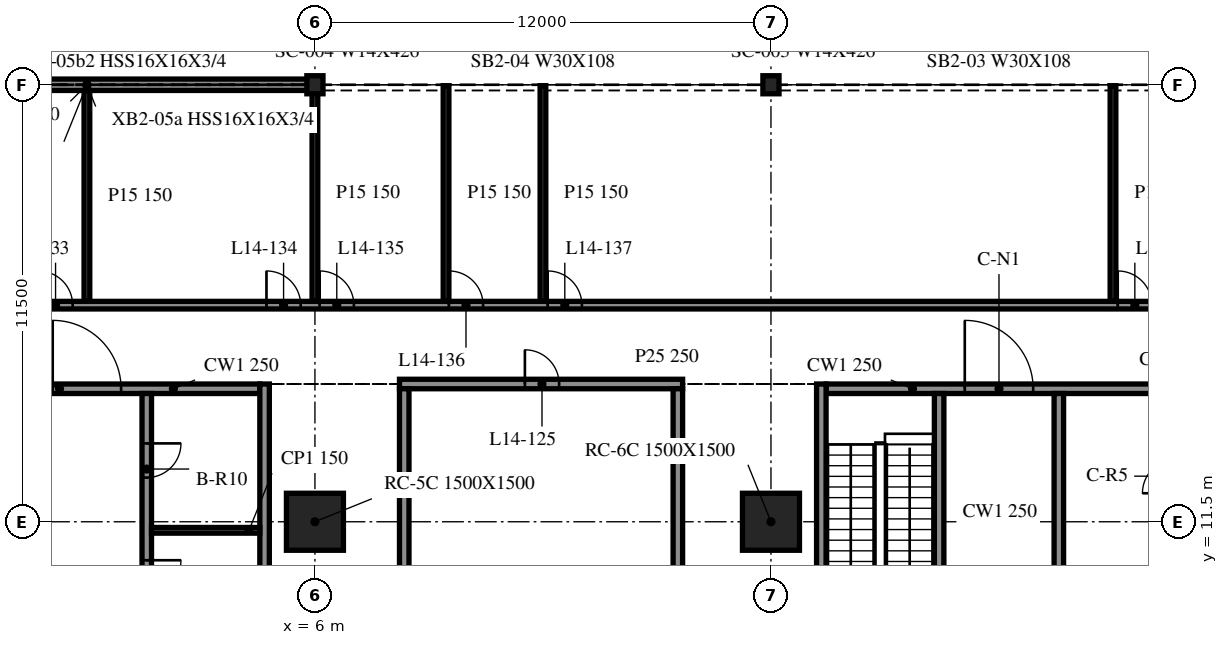
"""IFC4 building model, lengths in metres.
Left out: names, types, materials, properties, quantities, classifications, styles, units other than length and angle.
Written with IfcOpenShell. Run it as: python <this file> out.ifc"""

import sys

from ifc_helpers import new_model, si_unit, direction, frame, frame_2d, origin, origin_2d, place, context, subcontext, project, spatial, rectangle, i_section, extrude, element, fill, save


model = new_model("IFC4")
c1 = context("Model", 3, precision=1e-05, world=origin(), true_north=direction((0.0, 1.0)))
c2 = subcontext(c1, "Body", "Model", "MODEL_VIEW")
j1 = project(units=[si_unit("LENGTHUNIT", "METRE"), si_unit("PLANEANGLEUNIT", "RADIAN")], contexts=[c1])
p1 = place(None, origin())
s1 = spatial("IfcSite", under=j1, at=p1, CompositionType="ELEMENT")
p2 = place(p1, origin())
s2 = spatial("IfcBuilding", under=s1, at=p2, CompositionType="ELEMENT")
p3 = place(p2, frame((0.0, 0.0, 63.2)))
s3 = spatial("IfcBuildingStorey", under=s2, at=p3, CompositionType="ELEMENT", Elevation=63.2)
for number, where, z_axis, x_axis in (
    (1, (6.0, 11.5, -0.34), (0.0, 0.0, 1.0), (1.0, 0.0, 0.0)),
    (2, (18.0, 11.5, -0.34), (0.0, 0.0, 1.0), (1.0, 0.0, 0.0)),
):
    element("IfcColumn", number, at=place(p3, frame(where, z_axis=z_axis, x_axis=x_axis)), inside=s3, PredefinedType="COLUMN", context=c2, shape_type="SweptSolid", body=[
        extrude(rectangle(XDim=1.5, YDim=1.5, at=origin_2d()), origin(), (0.0, 0.0, 1.0), 4.3),
    ])
for number, where, z_axis, x_axis in (
    (3, (18.0, 23.0, -0.34), (0.0, 0.0, 1.0), (1.0, 0.0, 0.0)),
    (4, (6.0, 23.0, -0.34), (0.0, 0.0, 1.0), (1.0, 0.0, 0.0)),
):
    element("IfcColumn", number, at=place(p3, frame(where, z_axis=z_axis, x_axis=x_axis)), inside=s3, PredefinedType="COLUMN", context=c2, shape_type="SweptSolid", body=[
        extrude(i_section(OverallWidth=0.424, OverallDepth=0.475, WebThickness=0.048, FlangeThickness=0.077, at=origin_2d()), origin(), (0.0, 0.0, 1.0), 4.3),
    ])
p4 = place(p3, frame((5.976, 23.0, 0.0), z_axis=(0.0, 0.0, 1.0), x_axis=(-1.0, 0.0, 0.0)))
e5 = element("IfcWall", 5, at=p4, inside=s3, PredefinedType="NOTDEFINED", context=c2, shape_type="SweptSolid", body=[
    extrude(rectangle(XDim=11.952, YDim=0.3, at=frame_2d((5.976, 0.0))), origin(), (0.0, 0.0, 1.0), 3.203),
])
p5 = place(p3, frame((4.675, -9.125, 0.0), z_axis=(0.0, 0.0, 1.0), x_axis=(0.0, 1.0, 0.0)))
e6 = element("IfcWall", 6, at=p5, inside=s3, PredefinedType="SOLIDWALL", context=c2, shape_type="SweptSolid", body=[
    extrude(rectangle(XDim=24.25, YDim=0.25, at=frame_2d((12.125, 0.0))), origin(), (0.0, 0.0, 1.0), 3.96),
])
p6 = place(p3, frame((-4.55, 15.0, 0.0), z_axis=(0.0, 0.0, 1.0), x_axis=(1.0, 0.0, 0.0)))
e7 = element("IfcWall", 7, at=p6, inside=s3, PredefinedType="SOLIDWALL", context=c2, shape_type="SweptSolid", body=[
    extrude(rectangle(XDim=9.1, YDim=0.25, at=frame_2d((4.55, 0.0))), origin(), (0.0, 0.0, 1.0), 3.96),
])
p7 = place(p6, frame((3.65, 0.0, 0.0)))
e8 = element("IfcOpeningElement", 8, at=p7, cuts=e7, PredefinedType="OPENING", context=c2, shape_type="SweptSolid", body=[
    extrude(rectangle(XDim=1.8, YDim=2.1, at=frame_2d((0.9, 1.05))), frame((0.0, 0.135, 0.0), z_axis=(0.0, -1.0, 0.0), x_axis=(1.0, 0.0, 0.0)), (0.0, 0.0, 1.0), 0.27),
])
p8 = place(p3, frame((1.575, 14.875, 0.0), z_axis=(0.0, 0.0, 1.0), x_axis=(0.0, -1.0, 0.0)))
e9 = element("IfcWall", 9, at=p8, inside=s3, PredefinedType="SOLIDWALL", context=c2, shape_type="SweptSolid", body=[
    extrude(rectangle(XDim=17.5, YDim=0.25, at=frame_2d((8.75, 0.0))), origin(), (0.0, 0.0, 1.0), 3.96),
])
p9 = place(p8, frame((15.225, 0.0, 0.0)))
e10 = element("IfcOpeningElement", 10, at=p9, cuts=e9, PredefinedType="OPENING", context=c2, shape_type="SweptSolid", body=[
    extrude(rectangle(XDim=0.9, YDim=2.1, at=frame_2d((0.45, 1.05))), frame((0.0, 0.135, 0.0), z_axis=(0.0, -1.0, 0.0), x_axis=(1.0, 0.0, 0.0)), (0.0, 0.0, 1.0), 0.27),
])
p10 = place(p8, frame((11.425, 0.0, 0.0)))
e11 = element("IfcOpeningElement", 11, at=p10, cuts=e9, PredefinedType="OPENING", context=c2, shape_type="SweptSolid", body=[
    extrude(rectangle(XDim=0.9, YDim=2.1, at=frame_2d((0.45, 1.05))), frame((0.0, 0.135, 0.0), z_axis=(0.0, -1.0, 0.0), x_axis=(1.0, 0.0, 0.0)), (0.0, 0.0, 1.0), 0.27),
])
p11 = place(p8, frame((7.625, 0.0, 0.0)))
e12 = element("IfcOpeningElement", 12, at=p11, cuts=e9, PredefinedType="OPENING", context=c2, shape_type="SweptSolid", body=[
    extrude(rectangle(XDim=0.9, YDim=2.1, at=frame_2d((0.45, 1.05))), frame((0.0, 0.135, 0.0), z_axis=(0.0, -1.0, 0.0), x_axis=(1.0, 0.0, 0.0)), (0.0, 0.0, 1.0), 0.27),
])
p12 = place(p8, frame((4.387, 0.0, 0.0)))
e13 = element("IfcOpeningElement", 13, at=p12, cuts=e9, PredefinedType="OPENING", context=c2, shape_type="SweptSolid", body=[
    extrude(rectangle(XDim=0.9, YDim=2.1, at=frame_2d((0.45, 1.05))), frame((0.0, 0.135, 0.0), z_axis=(0.0, -1.0, 0.0), x_axis=(1.0, 0.0, 0.0)), (0.0, 0.0, 1.0), 0.27),
])
p13 = place(p8, frame((1.312, 0.0, 0.0)))
e14 = element("IfcOpeningElement", 14, at=p13, cuts=e9, PredefinedType="OPENING", context=c2, shape_type="SweptSolid", body=[
    extrude(rectangle(XDim=0.9, YDim=2.1, at=frame_2d((0.45, 1.05))), frame((0.0, 0.135, 0.0), z_axis=(0.0, -1.0, 0.0), x_axis=(1.0, 0.0, 0.0)), (0.0, 0.0, 1.0), 0.27),
])
p14 = place(p3, frame((1.7, 11.275, 0.0), z_axis=(0.0, 0.0, 1.0), x_axis=(1.0, 0.0, 0.0)))
e15 = element("IfcWall", 15, at=p14, inside=s3, PredefinedType="PARTITIONING", context=c2, shape_type="SweptSolid", body=[
    extrude(rectangle(XDim=2.85, YDim=0.15, at=frame_2d((1.425, 0.0))), origin(), (0.0, 0.0, 1.0), 3.96),
])
p15 = place(p3, frame((19.325, 15.125, 0.0), z_axis=(0.0, 0.0, 1.0), x_axis=(0.0, -1.0, 0.0)))
e16 = element("IfcWall", 16, at=p15, inside=s3, PredefinedType="SOLIDWALL", context=c2, shape_type="SweptSolid", body=[
    extrude(rectangle(XDim=24.25, YDim=0.25, at=frame_2d((12.125, 0.0))), origin(), (0.0, 0.0, 1.0), 3.96),
])
p16 = place(p3, frame((19.45, 15.0, 0.0), z_axis=(0.0, 0.0, 1.0), x_axis=(1.0, 0.0, 0.0)))
e17 = element("IfcWall", 17, at=p16, inside=s3, PredefinedType="SOLIDWALL", context=c2, shape_type="SweptSolid", body=[
    extrude(rectangle(XDim=9.1, YDim=0.25, at=frame_2d((4.55, 0.0))), origin(), (0.0, 0.0, 1.0), 3.96),
])
p17 = place(p16, frame((3.65, 0.0, 0.0)))
e18 = element("IfcOpeningElement", 18, at=p17, cuts=e17, PredefinedType="OPENING", context=c2, shape_type="SweptSolid", body=[
    extrude(rectangle(XDim=1.8, YDim=2.1, at=frame_2d((0.9, 1.05))), frame((0.0, 0.135, 0.0), z_axis=(0.0, -1.0, 0.0), x_axis=(1.0, 0.0, 0.0)), (0.0, 0.0, 1.0), 0.27),
])
p18 = place(p3, frame((22.425, 14.875, 0.0), z_axis=(0.0, 0.0, 1.0), x_axis=(0.0, -1.0, 0.0)))
e19 = element("IfcWall", 19, at=p18, inside=s3, PredefinedType="SOLIDWALL", context=c2, shape_type="SweptSolid", body=[
    extrude(rectangle(XDim=6.25, YDim=0.25, at=frame_2d((3.125, 0.0))), origin(), (0.0, 0.0, 1.0), 3.96),
])
p19 = place(p18, frame((4.85, 0.0, 0.0)))
e20 = element("IfcOpeningElement", 20, at=p19, cuts=e19, PredefinedType="OPENING", context=c2, shape_type="SweptSolid", body=[
    extrude(rectangle(XDim=1.0, YDim=2.1, at=frame_2d((0.5, 1.05))), frame((0.0, 0.135, 0.0), z_axis=(0.0, -1.0, 0.0), x_axis=(1.0, 0.0, 0.0)), (0.0, 0.0, 1.0), 0.27),
])
p20 = place(p3, frame((25.575, 14.875, 0.0), z_axis=(0.0, 0.0, 1.0), x_axis=(0.0, -1.0, 0.0)))
e21 = element("IfcWall", 21, at=p20, inside=s3, PredefinedType="SOLIDWALL", context=c2, shape_type="SweptSolid", body=[
    extrude(rectangle(XDim=17.5, YDim=0.25, at=frame_2d((8.75, 0.0))), origin(), (0.0, 0.0, 1.0), 3.96),
])
p21 = place(p20, frame((15.45, 0.0, 0.0)))
e22 = element("IfcOpeningElement", 22, at=p21, cuts=e21, PredefinedType="OPENING", context=c2, shape_type="SweptSolid", body=[
    extrude(rectangle(XDim=1.1, YDim=2.1, at=frame_2d((0.55, 1.05))), frame((0.0, 0.135, 0.0), z_axis=(0.0, -1.0, 0.0), x_axis=(1.0, 0.0, 0.0)), (0.0, 0.0, 1.0), 0.27),
])
p22 = place(p20, frame((12.8, 0.0, 0.0)))
e23 = element("IfcOpeningElement", 23, at=p22, cuts=e21, PredefinedType="OPENING", context=c2, shape_type="SweptSolid", body=[
    extrude(rectangle(XDim=0.9, YDim=2.1, at=frame_2d((0.45, 1.05))), frame((0.0, 0.135, 0.0), z_axis=(0.0, -1.0, 0.0), x_axis=(1.0, 0.0, 0.0)), (0.0, 0.0, 1.0), 0.27),
])
p23 = place(p3, frame((8.225, 15.125, 0.0), z_axis=(0.0, 0.0, 1.0), x_axis=(1.0, 0.0, 0.0)))
e24 = element("IfcWall", 24, at=p23, inside=s3, PredefinedType="PARTITIONING", context=c2, shape_type="SweptSolid", body=[
    extrude(rectangle(XDim=7.45, YDim=0.25, at=frame_2d((3.725, 0.0))), origin(), (0.0, 0.0, 1.0), 3.96),
])
p24 = place(p23, frame((3.3, 0.0, 0.0)))
e25 = element("IfcOpeningElement", 25, at=p24, cuts=e24, PredefinedType="OPENING", context=c2, shape_type="SweptSolid", body=[
    extrude(rectangle(XDim=0.9, YDim=2.1, at=frame_2d((0.45, 1.05))), frame((0.0, 0.135, 0.0), z_axis=(0.0, -1.0, 0.0), x_axis=(1.0, 0.0, 0.0)), (0.0, 0.0, 1.0), 0.27),
])
p25 = place(p3, frame((-41.975, 17.2, 0.0), z_axis=(0.0, 0.0, 1.0), x_axis=(1.0, 0.0, 0.0)))
e26 = element("IfcWall", 26, at=p25, inside=s3, PredefinedType="PARTITIONING", context=c2, shape_type="SweptSolid", body=[
    extrude(rectangle(XDim=95.782, YDim=0.2, at=frame_2d((47.891, 0.0))), origin(), (0.0, 0.0, 1.0), 3.96),
])
p26 = place(p25, frame((13.7, 0.0, 0.0)))
e27 = element("IfcOpeningElement", 27, at=p26, cuts=e26, PredefinedType="OPENING", context=c2, shape_type="SweptSolid", body=[
    extrude(rectangle(XDim=0.9, YDim=2.1, at=frame_2d((0.45, 1.05))), frame((0.0, 0.11, 0.0), z_axis=(0.0, -1.0, 0.0), x_axis=(1.0, 0.0, 0.0)), (0.0, 0.0, 1.0), 0.22),
])
p27 = place(p25, frame((19.7, 0.0, 0.0)))
e28 = element("IfcOpeningElement", 28, at=p27, cuts=e26, PredefinedType="OPENING", context=c2, shape_type="SweptSolid", body=[
    extrude(rectangle(XDim=0.9, YDim=2.1, at=frame_2d((0.45, 1.05))), frame((0.0, 0.11, 0.0), z_axis=(0.0, -1.0, 0.0), x_axis=(1.0, 0.0, 0.0)), (0.0, 0.0, 1.0), 0.22),
])
p28 = place(p25, frame((23.1, 0.0, 0.0)))
e29 = element("IfcOpeningElement", 29, at=p28, cuts=e26, PredefinedType="OPENING", context=c2, shape_type="SweptSolid", body=[
    extrude(rectangle(XDim=0.9, YDim=2.1, at=frame_2d((0.45, 1.05))), frame((0.0, 0.11, 0.0), z_axis=(0.0, -1.0, 0.0), x_axis=(1.0, 0.0, 0.0)), (0.0, 0.0, 1.0), 0.22),
])
p29 = place(p25, frame((25.7, 0.0, 0.0)))
e30 = element("IfcOpeningElement", 30, at=p29, cuts=e26, PredefinedType="OPENING", context=c2, shape_type="SweptSolid", body=[
    extrude(rectangle(XDim=0.9, YDim=2.1, at=frame_2d((0.45, 1.05))), frame((0.0, 0.11, 0.0), z_axis=(0.0, -1.0, 0.0), x_axis=(1.0, 0.0, 0.0)), (0.0, 0.0, 1.0), 0.22),
])
p30 = place(p25, frame((40.7, 0.0, 0.0)))
e31 = element("IfcOpeningElement", 31, at=p30, cuts=e26, PredefinedType="OPENING", context=c2, shape_type="SweptSolid", body=[
    extrude(rectangle(XDim=0.9, YDim=2.1, at=frame_2d((0.45, 1.05))), frame((0.0, 0.11, 0.0), z_axis=(0.0, -1.0, 0.0), x_axis=(1.0, 0.0, 0.0)), (0.0, 0.0, 1.0), 0.22),
])
p31 = place(p25, frame((46.7, 0.0, 0.0)))
e32 = element("IfcOpeningElement", 32, at=p31, cuts=e26, PredefinedType="OPENING", context=c2, shape_type="SweptSolid", body=[
    extrude(rectangle(XDim=0.9, YDim=2.1, at=frame_2d((0.45, 1.05))), frame((0.0, 0.11, 0.0), z_axis=(0.0, -1.0, 0.0), x_axis=(1.0, 0.0, 0.0)), (0.0, 0.0, 1.0), 0.22),
])
p32 = place(p25, frame((48.1, 0.0, 0.0)))
e33 = element("IfcOpeningElement", 33, at=p32, cuts=e26, PredefinedType="OPENING", context=c2, shape_type="SweptSolid", body=[
    extrude(rectangle(XDim=0.9, YDim=2.1, at=frame_2d((0.45, 1.05))), frame((0.0, 0.11, 0.0), z_axis=(0.0, -1.0, 0.0), x_axis=(1.0, 0.0, 0.0)), (0.0, 0.0, 1.0), 0.22),
])
p33 = place(p25, frame((51.5, 0.0, 0.0)))
e34 = element("IfcOpeningElement", 34, at=p33, cuts=e26, PredefinedType="OPENING", context=c2, shape_type="SweptSolid", body=[
    extrude(rectangle(XDim=0.9, YDim=2.1, at=frame_2d((0.45, 1.05))), frame((0.0, 0.11, 0.0), z_axis=(0.0, -1.0, 0.0), x_axis=(1.0, 0.0, 0.0)), (0.0, 0.0, 1.0), 0.22),
])
p34 = place(p25, frame((54.1, 0.0, 0.0)))
e35 = element("IfcOpeningElement", 35, at=p34, cuts=e26, PredefinedType="OPENING", context=c2, shape_type="SweptSolid", body=[
    extrude(rectangle(XDim=0.9, YDim=2.1, at=frame_2d((0.45, 1.05))), frame((0.0, 0.11, 0.0), z_axis=(0.0, -1.0, 0.0), x_axis=(1.0, 0.0, 0.0)), (0.0, 0.0, 1.0), 0.22),
])
p35 = place(p25, frame((69.1, 0.0, 0.0)))
e36 = element("IfcOpeningElement", 36, at=p35, cuts=e26, PredefinedType="OPENING", context=c2, shape_type="SweptSolid", body=[
    extrude(rectangle(XDim=0.9, YDim=2.1, at=frame_2d((0.45, 1.05))), frame((0.0, 0.11, 0.0), z_axis=(0.0, -1.0, 0.0), x_axis=(1.0, 0.0, 0.0)), (0.0, 0.0, 1.0), 0.22),
])
p36 = place(p25, frame((75.1, 0.0, 0.0)))
e37 = element("IfcOpeningElement", 37, at=p36, cuts=e26, PredefinedType="OPENING", context=c2, shape_type="SweptSolid", body=[
    extrude(rectangle(XDim=0.9, YDim=2.1, at=frame_2d((0.45, 1.05))), frame((0.0, 0.11, 0.0), z_axis=(0.0, -1.0, 0.0), x_axis=(1.0, 0.0, 0.0)), (0.0, 0.0, 1.0), 0.22),
])
p37 = place(p25, frame((78.5, 0.0, 0.0)))
e38 = element("IfcOpeningElement", 38, at=p37, cuts=e26, PredefinedType="OPENING", context=c2, shape_type="SweptSolid", body=[
    extrude(rectangle(XDim=0.9, YDim=2.1, at=frame_2d((0.45, 1.05))), frame((0.0, 0.11, 0.0), z_axis=(0.0, -1.0, 0.0), x_axis=(1.0, 0.0, 0.0)), (0.0, 0.0, 1.0), 0.22),
])
p38 = place(p25, frame((81.1, 0.0, 0.0)))
e39 = element("IfcOpeningElement", 39, at=p38, cuts=e26, PredefinedType="OPENING", context=c2, shape_type="SweptSolid", body=[
    extrude(rectangle(XDim=0.9, YDim=2.1, at=frame_2d((0.45, 1.05))), frame((0.0, 0.11, 0.0), z_axis=(0.0, -1.0, 0.0), x_axis=(1.0, 0.0, 0.0)), (0.0, 0.0, 1.0), 0.22),
])
p39 = place(p3, frame((0.0, 17.3, 0.0), z_axis=(0.0, 0.0, 1.0), x_axis=(0.0, 1.0, 0.0)))
e40 = element("IfcWall", 40, at=p39, inside=s3, PredefinedType="PARTITIONING", context=c2, shape_type="SweptSolid", body=[
    extrude(rectangle(XDim=5.55, YDim=0.15, at=frame_2d((2.775, 0.0))), origin(), (0.0, 0.0, 1.0), 3.96),
])
p40 = place(p3, frame((6.0, 17.3, 0.0), z_axis=(0.0, 0.0, 1.0), x_axis=(0.0, 1.0, 0.0)))
e41 = element("IfcWall", 41, at=p40, inside=s3, PredefinedType="PARTITIONING", context=c2, shape_type="SweptSolid", body=[
    extrude(rectangle(XDim=5.675, YDim=0.15, at=frame_2d((2.837, 0.0))), origin(), (0.0, 0.0, 1.0), 3.96),
])
p41 = place(p3, frame((8.35, -9.0, 0.0), z_axis=(0.0, 0.0, 1.0), x_axis=(0.0, 1.0, 0.0)))
e42 = element("IfcWall", 42, at=p41, inside=s3, PredefinedType="PARTITIONING", context=c2, shape_type="SweptSolid", body=[
    extrude(rectangle(XDim=24.0, YDim=0.25, at=frame_2d((12.0, 0.0))), origin(), (0.0, 0.0, 1.0), 3.96),
])
for number, where, z_axis, x_axis in (
    (43, (9.45, 17.3, 0.0), (0.0, 0.0, 1.0), (0.0, 1.0, 0.0)),
    (44, (12.0, 17.3, 0.0), (0.0, 0.0, 1.0), (0.0, 1.0, 0.0)),
):
    element("IfcWall", number, at=place(p3, frame(where, z_axis=z_axis, x_axis=x_axis)), inside=s3, PredefinedType="PARTITIONING", context=c2, shape_type="SweptSolid", body=[
        extrude(rectangle(XDim=5.675, YDim=0.15, at=frame_2d((2.837, 0.0))), origin(), (0.0, 0.0, 1.0), 3.96),
    ])
p42 = place(p3, frame((15.55, -9.0, 0.0), z_axis=(0.0, 0.0, 1.0), x_axis=(0.0, 1.0, 0.0)))
e45 = element("IfcWall", 45, at=p42, inside=s3, PredefinedType="PARTITIONING", context=c2, shape_type="SweptSolid", body=[
    extrude(rectangle(XDim=24.0, YDim=0.25, at=frame_2d((12.0, 0.0))), origin(), (0.0, 0.0, 1.0), 3.96),
])
p43 = place(p3, frame((27.0, 17.3, 0.0), z_axis=(0.0, 0.0, 1.0), x_axis=(0.0, 1.0, 0.0)))
e46 = element("IfcWall", 46, at=p43, inside=s3, PredefinedType="PARTITIONING", context=c2, shape_type="SweptSolid", body=[
    extrude(rectangle(XDim=5.675, YDim=0.15, at=frame_2d((2.837, 0.0))), origin(), (0.0, 0.0, 1.0), 3.96),
])
p44 = place(p7, origin())
e47 = element("IfcDoor", 47, at=p44, inside=s3, OperationType="DOUBLE_DOOR_SINGLE_SWING", PredefinedType="DOOR", context=c2, shape_type="SweptSolid", body=[
    extrude(rectangle(XDim=1.8, YDim=2.1, at=frame_2d((0.9, 1.05))), frame((0.0, 0.025, 0.0), z_axis=(0.0, -1.0, 0.0), x_axis=(1.0, 0.0, 0.0)), (0.0, 0.0, 1.0), 0.05),
])
fill(e8, e47)
p45 = place(p12, origin())
e48 = element("IfcDoor", 48, at=p45, inside=s3, OperationType="SINGLE_SWING_LEFT", PredefinedType="DOOR", context=c2, shape_type="SweptSolid", body=[
    extrude(rectangle(XDim=0.9, YDim=2.1, at=frame_2d((0.45, 1.05))), frame((0.0, 0.025, 0.0), z_axis=(0.0, -1.0, 0.0), x_axis=(1.0, 0.0, 0.0)), (0.0, 0.0, 1.0), 0.05),
])
fill(e13, e48)
p46 = place(p13, origin())
e49 = element("IfcDoor", 49, at=p46, inside=s3, OperationType="SINGLE_SWING_RIGHT", PredefinedType="DOOR", context=c2, shape_type="SweptSolid", body=[
    extrude(rectangle(XDim=0.9, YDim=2.1, at=frame_2d((0.45, 1.05))), frame((0.0, 0.025, 0.0), z_axis=(0.0, -1.0, 0.0), x_axis=(1.0, 0.0, 0.0)), (0.0, 0.0, 1.0), 0.05),
])
fill(e14, e49)
p47 = place(p17, origin())
e50 = element("IfcDoor", 50, at=p47, inside=s3, OperationType="DOUBLE_DOOR_SINGLE_SWING", PredefinedType="DOOR", context=c2, shape_type="SweptSolid", body=[
    extrude(rectangle(XDim=1.8, YDim=2.1, at=frame_2d((0.9, 1.05))), frame((0.0, 0.025, 0.0), z_axis=(0.0, -1.0, 0.0), x_axis=(1.0, 0.0, 0.0)), (0.0, 0.0, 1.0), 0.05),
])
fill(e18, e50)
p48 = place(p24, origin())
e51 = element("IfcDoor", 51, at=p48, inside=s3, OperationType="SINGLE_SWING_LEFT", PredefinedType="DOOR", context=c2, shape_type="SweptSolid", body=[
    extrude(rectangle(XDim=0.9, YDim=2.1, at=frame_2d((0.45, 1.05))), frame((0.0, 0.025, 0.0), z_axis=(0.0, -1.0, 0.0), x_axis=(1.0, 0.0, 0.0)), (0.0, 0.0, 1.0), 0.05),
])
fill(e25, e51)
p49 = place(p30, origin())
e52 = element("IfcDoor", 52, at=p49, inside=s3, OperationType="SINGLE_SWING_LEFT", PredefinedType="DOOR", context=c2, shape_type="SweptSolid", body=[
    extrude(rectangle(XDim=0.9, YDim=2.1, at=frame_2d((0.45, 1.05))), frame((0.0, 0.025, 0.0), z_axis=(0.0, -1.0, 0.0), x_axis=(1.0, 0.0, 0.0)), (0.0, 0.0, 1.0), 0.05),
])
fill(e31, e52)
p50 = place(p31, origin())
e53 = element("IfcDoor", 53, at=p50, inside=s3, OperationType="SINGLE_SWING_LEFT", PredefinedType="DOOR", context=c2, shape_type="SweptSolid", body=[
    extrude(rectangle(XDim=0.9, YDim=2.1, at=frame_2d((0.45, 1.05))), frame((0.0, 0.025, 0.0), z_axis=(0.0, -1.0, 0.0), x_axis=(1.0, 0.0, 0.0)), (0.0, 0.0, 1.0), 0.05),
])
fill(e32, e53)
p51 = place(p32, origin())
e54 = element("IfcDoor", 54, at=p51, inside=s3, OperationType="SINGLE_SWING_RIGHT", PredefinedType="DOOR", context=c2, shape_type="SweptSolid", body=[
    extrude(rectangle(XDim=0.9, YDim=2.1, at=frame_2d((0.45, 1.05))), frame((0.0, 0.025, 0.0), z_axis=(0.0, -1.0, 0.0), x_axis=(1.0, 0.0, 0.0)), (0.0, 0.0, 1.0), 0.05),
])
fill(e33, e54)
p52 = place(p33, origin())
e55 = element("IfcDoor", 55, at=p52, inside=s3, OperationType="SINGLE_SWING_RIGHT", PredefinedType="DOOR", context=c2, shape_type="SweptSolid", body=[
    extrude(rectangle(XDim=0.9, YDim=2.1, at=frame_2d((0.45, 1.05))), frame((0.0, 0.025, 0.0), z_axis=(0.0, -1.0, 0.0), x_axis=(1.0, 0.0, 0.0)), (0.0, 0.0, 1.0), 0.05),
])
fill(e34, e55)
p53 = place(p34, origin())
e56 = element("IfcDoor", 56, at=p53, inside=s3, OperationType="SINGLE_SWING_RIGHT", PredefinedType="DOOR", context=c2, shape_type="SweptSolid", body=[
    extrude(rectangle(XDim=0.9, YDim=2.1, at=frame_2d((0.45, 1.05))), frame((0.0, 0.025, 0.0), z_axis=(0.0, -1.0, 0.0), x_axis=(1.0, 0.0, 0.0)), (0.0, 0.0, 1.0), 0.05),
])
fill(e35, e56)
p54 = place(p35, origin())
e57 = element("IfcDoor", 57, at=p54, inside=s3, OperationType="SINGLE_SWING_RIGHT", PredefinedType="DOOR", context=c2, shape_type="SweptSolid", body=[
    extrude(rectangle(XDim=0.9, YDim=2.1, at=frame_2d((0.45, 1.05))), frame((0.0, 0.025, 0.0), z_axis=(0.0, -1.0, 0.0), x_axis=(1.0, 0.0, 0.0)), (0.0, 0.0, 1.0), 0.05),
])
fill(e36, e57)
save(model, sys.argv[1])
